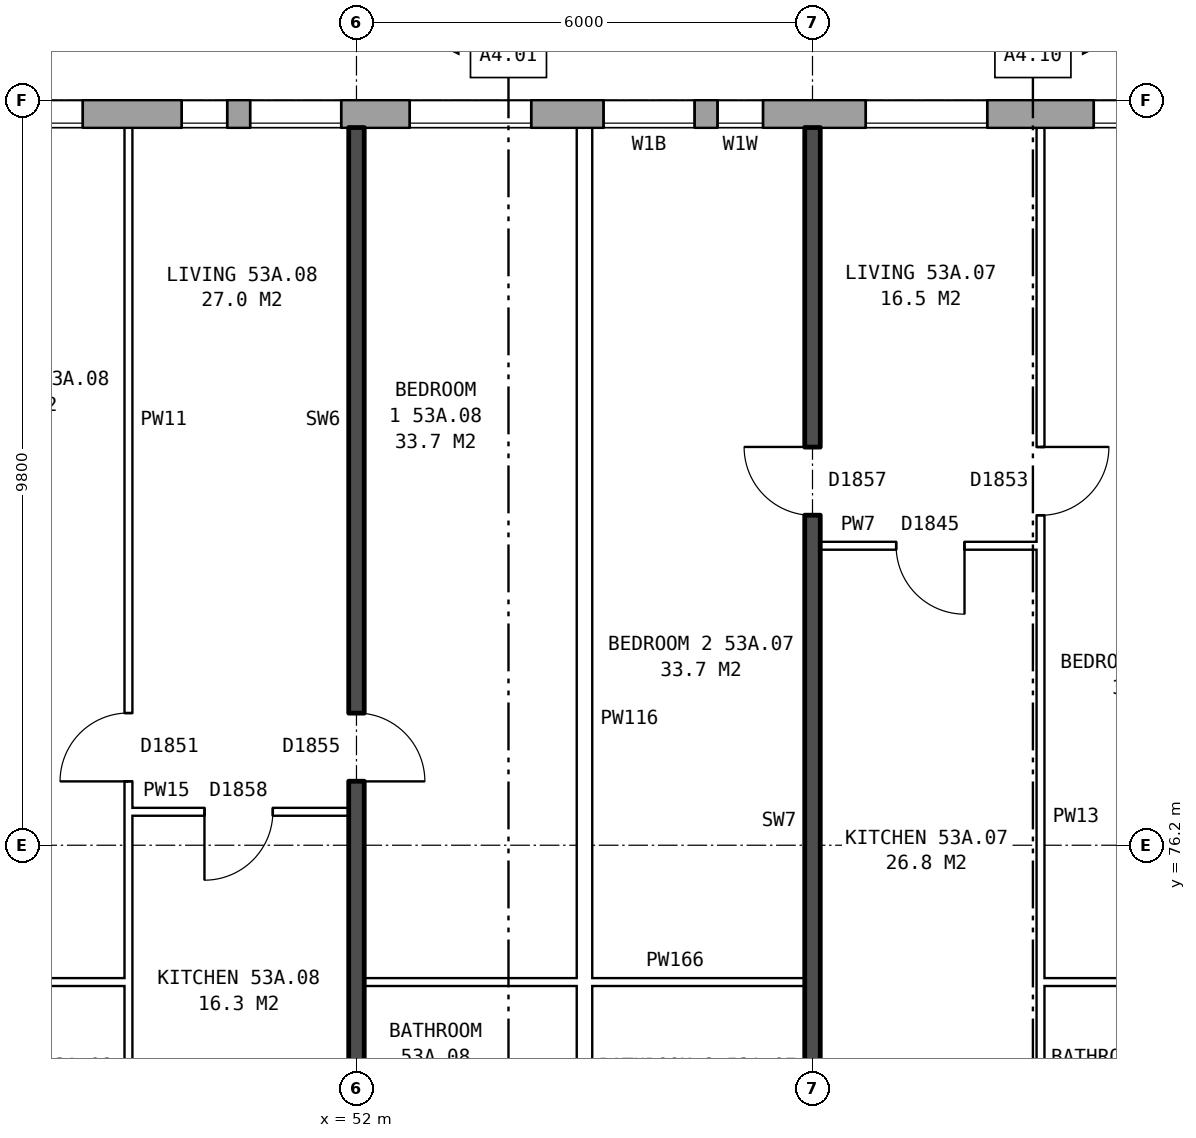
"""IFC4 building model, lengths in metres.
Left out: names, types, materials, properties, quantities, classifications, styles, units other than length and angle.
Written with IfcOpenShell. Run it as: python <this file> out.ifc"""

import sys

from ifc_helpers import new_model, si_unit, direction, frame, frame_2d, origin, place, context, subcontext, project, spatial, rectangle, extrude, element, fill, save


model = new_model("IFC4")
c1 = context("Model", 3, precision=1e-05, world=origin(), true_north=direction((0.0, 1.0)))
c2 = subcontext(c1, "Body", "Model", "MODEL_VIEW")
j1 = project(units=[si_unit("LENGTHUNIT", "METRE"), si_unit("PLANEANGLEUNIT", "RADIAN")], contexts=[c1])
p1 = place(None, origin())
s1 = spatial("IfcSite", under=j1, at=p1, CompositionType="ELEMENT")
p2 = place(p1, origin())
s2 = spatial("IfcBuilding", under=s1, at=p2, CompositionType="ELEMENT")
p3 = place(p2, frame((0.0, 0.0, 188.2)))
s3 = spatial("IfcBuildingStorey", under=s2, at=p3, CompositionType="ELEMENT", Elevation=188.2)
p4 = place(p3, frame((72.925, 85.82, 0.0), z_axis=(0.0, 0.0, 1.0), x_axis=(-1.0, 0.0, 0.0)))
e1 = element("IfcWall", 1, at=p4, inside=s3, PredefinedType="STANDARD", context=c2, shape_type="SweptSolid", body=[
    extrude(rectangle(XDim=39.601, YDim=0.36, at=frame_2d((19.8, 0.0))), origin(), (0.0, 0.0, 1.0), 2.85),
])
p5 = place(p4, frame((0.625, 0.0, 0.8)))
e2 = element("IfcOpeningElement", 2, at=p5, cuts=e1, PredefinedType="OPENING", context=c2, shape_type="SweptSolid", body=[
    extrude(rectangle(XDim=1.6, YDim=1.8, at=frame_2d((0.8, 0.9))), frame((0.0, 0.19, 0.0), z_axis=(0.0, -1.0, 0.0), x_axis=(1.0, 0.0, 0.0)), (0.0, 0.0, 1.0), 0.38),
])
p6 = place(p4, frame((3.625, 0.0, 0.8)))
e3 = element("IfcOpeningElement", 3, at=p6, cuts=e1, PredefinedType="OPENING", context=c2, shape_type="SweptSolid", body=[
    extrude(rectangle(XDim=1.6, YDim=1.8, at=frame_2d((0.8, 0.9))), frame((0.0, 0.19, 0.0), z_axis=(0.0, -1.0, 0.0), x_axis=(1.0, 0.0, 0.0)), (0.0, 0.0, 1.0), 0.38),
])
p7 = place(p4, frame((6.625, 0.0, 0.8)))
e4 = element("IfcOpeningElement", 4, at=p7, cuts=e1, PredefinedType="OPENING", context=c2, shape_type="SweptSolid", body=[
    extrude(rectangle(XDim=1.6, YDim=1.8, at=frame_2d((0.8, 0.9))), frame((0.0, 0.19, 0.0), z_axis=(0.0, -1.0, 0.0), x_axis=(1.0, 0.0, 0.0)), (0.0, 0.0, 1.0), 0.38),
])
p8 = place(p4, frame((9.625, 0.0, 0.8)))
e5 = element("IfcOpeningElement", 5, at=p8, cuts=e1, PredefinedType="OPENING", context=c2, shape_type="SweptSolid", body=[
    extrude(rectangle(XDim=1.6, YDim=1.8, at=frame_2d((0.8, 0.9))), frame((0.0, 0.19, 0.0), z_axis=(0.0, -1.0, 0.0), x_axis=(1.0, 0.0, 0.0)), (0.0, 0.0, 1.0), 0.38),
])
p9 = place(p4, frame((12.625, 0.0, 0.8)))
e6 = element("IfcOpeningElement", 6, at=p9, cuts=e1, PredefinedType="OPENING", context=c2, shape_type="SweptSolid", body=[
    extrude(rectangle(XDim=1.6, YDim=1.8, at=frame_2d((0.8, 0.9))), frame((0.0, 0.19, 0.0), z_axis=(0.0, -1.0, 0.0), x_axis=(1.0, 0.0, 0.0)), (0.0, 0.0, 1.0), 0.38),
])
p10 = place(p4, frame((15.575, 0.0, 0.15)))
e7 = element("IfcOpeningElement", 7, at=p10, cuts=e1, PredefinedType="OPENING", context=c2, shape_type="SweptSolid", body=[
    extrude(rectangle(XDim=0.6, YDim=0.9, at=frame_2d((0.3, 0.45))), frame((0.0, 0.19, 0.0), z_axis=(0.0, -1.0, 0.0), x_axis=(1.0, 0.0, 0.0)), (0.0, 0.0, 1.0), 0.38),
])
p11 = place(p4, frame((18.625, 0.0, 0.8)))
e8 = element("IfcOpeningElement", 8, at=p11, cuts=e1, PredefinedType="OPENING", context=c2, shape_type="SweptSolid", body=[
    extrude(rectangle(XDim=1.6, YDim=1.8, at=frame_2d((0.8, 0.9))), frame((0.0, 0.19, 0.0), z_axis=(0.0, -1.0, 0.0), x_axis=(1.0, 0.0, 0.0)), (0.0, 0.0, 1.0), 0.38),
])
p12 = place(p4, frame((21.125, 0.0, 0.8)))
e9 = element("IfcOpeningElement", 9, at=p12, cuts=e1, PredefinedType="OPENING", context=c2, shape_type="SweptSolid", body=[
    extrude(rectangle(XDim=1.2, YDim=1.8, at=frame_2d((0.6, 0.9))), frame((0.0, 0.19, 0.0), z_axis=(0.0, -1.0, 0.0), x_axis=(1.0, 0.0, 0.0)), (0.0, 0.0, 1.0), 0.38),
])
p13 = place(p4, frame((24.525, 0.0, 1.7)))
e10 = element("IfcOpeningElement", 10, at=p13, cuts=e1, PredefinedType="OPENING", context=c2, shape_type="SweptSolid", body=[
    extrude(rectangle(XDim=0.6, YDim=0.9, at=frame_2d((0.3, 0.45))), frame((0.0, 0.19, 0.0), z_axis=(0.0, -1.0, 0.0), x_axis=(1.0, 0.0, 0.0)), (0.0, 0.0, 1.0), 0.38),
])
p14 = place(p4, frame((27.625, 0.0, 0.8)))
e11 = element("IfcOpeningElement", 11, at=p14, cuts=e1, PredefinedType="OPENING", context=c2, shape_type="SweptSolid", body=[
    extrude(rectangle(XDim=1.6, YDim=1.8, at=frame_2d((0.8, 0.9))), frame((0.0, 0.19, 0.0), z_axis=(0.0, -1.0, 0.0), x_axis=(1.0, 0.0, 0.0)), (0.0, 0.0, 1.0), 0.38),
])
p15 = place(p4, frame((30.625, 0.0, 0.8)))
e12 = element("IfcOpeningElement", 12, at=p15, cuts=e1, PredefinedType="OPENING", context=c2, shape_type="SweptSolid", body=[
    extrude(rectangle(XDim=1.6, YDim=1.8, at=frame_2d((0.8, 0.9))), frame((0.0, 0.19, 0.0), z_axis=(0.0, -1.0, 0.0), x_axis=(1.0, 0.0, 0.0)), (0.0, 0.0, 1.0), 0.38),
])
p16 = place(p4, frame((33.625, 0.0, 0.8)))
e13 = element("IfcOpeningElement", 13, at=p16, cuts=e1, PredefinedType="OPENING", context=c2, shape_type="SweptSolid", body=[
    extrude(rectangle(XDim=1.6, YDim=1.8, at=frame_2d((0.8, 0.9))), frame((0.0, 0.19, 0.0), z_axis=(0.0, -1.0, 0.0), x_axis=(1.0, 0.0, 0.0)), (0.0, 0.0, 1.0), 0.38),
])
p17 = place(p4, frame((36.625, 0.0, 0.8)))
e14 = element("IfcOpeningElement", 14, at=p17, cuts=e1, PredefinedType="OPENING", context=c2, shape_type="SweptSolid", body=[
    extrude(rectangle(XDim=1.6, YDim=1.8, at=frame_2d((0.8, 0.9))), frame((0.0, 0.19, 0.0), z_axis=(0.0, -1.0, 0.0), x_axis=(1.0, 0.0, 0.0)), (0.0, 0.0, 1.0), 0.38),
])
p18 = place(p4, frame((16.475, 0.0, 0.15)))
e15 = element("IfcOpeningElement", 15, at=p18, cuts=e1, PredefinedType="OPENING", context=c2, shape_type="SweptSolid", body=[
    extrude(rectangle(XDim=1.2, YDim=1.8, at=frame_2d((0.6, 0.9))), frame((0.0, 0.19, 0.0), z_axis=(0.0, -1.0, 0.0), x_axis=(1.0, 0.0, 0.0)), (0.0, 0.0, 1.0), 0.38),
])
p19 = place(p4, frame((22.625, 0.0, 0.8)))
e16 = element("IfcOpeningElement", 16, at=p19, cuts=e1, PredefinedType="OPENING", context=c2, shape_type="SweptSolid", body=[
    extrude(rectangle(XDim=0.6, YDim=0.9, at=frame_2d((0.3, 0.45))), frame((0.0, 0.19, 0.0), z_axis=(0.0, -1.0, 0.0), x_axis=(1.0, 0.0, 0.0)), (0.0, 0.0, 1.0), 0.38),
])
p20 = place(p4, frame((25.425, 0.0, 0.8)))
e17 = element("IfcOpeningElement", 17, at=p20, cuts=e1, PredefinedType="OPENING", context=c2, shape_type="SweptSolid", body=[
    extrude(rectangle(XDim=1.2, YDim=1.8, at=frame_2d((0.6, 0.9))), frame((0.0, 0.19, 0.0), z_axis=(0.0, -1.0, 0.0), x_axis=(1.0, 0.0, 0.0)), (0.0, 0.0, 1.0), 0.38),
])
p21 = place(p3, frame((46.1, 74.4, 0.0), z_axis=(0.0, 0.0, 1.0), x_axis=(1.0, 0.0, 0.0)))
e18 = element("IfcWall", 18, at=p21, inside=s3, PredefinedType="PARTITIONING", context=c2, shape_type="SweptSolid", body=[
    extrude(rectangle(XDim=2.9, YDim=0.1, at=frame_2d((1.45, 0.0))), origin(), (0.0, 0.0, 1.0), 2.85),
])
p22 = place(p3, frame((52.1, 74.4, 0.0), z_axis=(0.0, 0.0, 1.0), x_axis=(1.0, 0.0, 0.0)))
e19 = element("IfcWall", 19, at=p22, inside=s3, PredefinedType="PARTITIONING", context=c2, shape_type="SweptSolid", body=[
    extrude(rectangle(XDim=5.8, YDim=0.1, at=frame_2d((2.9, 0.0))), origin(), (0.0, 0.0, 1.0), 2.85),
])
p23 = place(p3, frame((61.0, 74.4, 0.0), z_axis=(0.0, 0.0, 1.0), x_axis=(1.0, 0.0, 0.0)))
e20 = element("IfcWall", 20, at=p23, inside=s3, PredefinedType="PARTITIONING", context=c2, shape_type="SweptSolid", body=[
    extrude(rectangle(XDim=2.64, YDim=0.1, at=frame_2d((1.32, 0.0))), origin(), (0.0, 0.0, 1.0), 2.85),
])
p24 = place(p3, frame((49.0, 76.64, 0.0), z_axis=(0.0, 0.0, 1.0), x_axis=(1.0, 0.0, 0.0)))
e21 = element("IfcWall", 21, at=p24, inside=s3, PredefinedType="PARTITIONING", context=c2, shape_type="SweptSolid", body=[
    extrude(rectangle(XDim=2.9, YDim=0.1, at=frame_2d((1.45, 0.0))), origin(), (0.0, 0.0, 1.0), 2.85),
])
p25 = place(p24, frame((1.0, 0.0, 0.0)))
e22 = element("IfcOpeningElement", 22, at=p25, cuts=e21, PredefinedType="OPENING", context=c2, shape_type="SweptSolid", body=[
    extrude(rectangle(XDim=0.9, YDim=2.1, at=frame_2d((0.45, 1.05))), frame((0.0, 0.06, 0.0), z_axis=(0.0, -1.0, 0.0), x_axis=(1.0, 0.0, 0.0)), (0.0, 0.0, 1.0), 0.12),
])
p26 = place(p3, frame((58.1, 80.14, 0.0), z_axis=(0.0, 0.0, 1.0), x_axis=(1.0, 0.0, 0.0)))
e23 = element("IfcWall", 23, at=p26, inside=s3, PredefinedType="PARTITIONING", context=c2, shape_type="SweptSolid", body=[
    extrude(rectangle(XDim=2.9, YDim=0.1, at=frame_2d((1.45, 0.0))), origin(), (0.0, 0.0, 1.0), 2.85),
])
p27 = place(p26, frame((1.0, 0.0, 0.0)))
e24 = element("IfcOpeningElement", 24, at=p27, cuts=e23, PredefinedType="OPENING", context=c2, shape_type="SweptSolid", body=[
    extrude(rectangle(XDim=0.9, YDim=2.1, at=frame_2d((0.45, 1.05))), frame((0.0, 0.06, 0.0), z_axis=(0.0, -1.0, 0.0), x_axis=(1.0, 0.0, 0.0)), (0.0, 0.0, 1.0), 0.12),
])
p28 = place(p3, frame((49.0, 71.3, 0.0), z_axis=(0.0, 0.0, 1.0), x_axis=(0.0, 1.0, 0.0)))
e25 = element("IfcWall", 25, at=p28, inside=s3, PredefinedType="PARTITIONING", context=c2, shape_type="SweptSolid", body=[
    extrude(rectangle(XDim=14.34, YDim=0.1, at=frame_2d((7.17, 0.0))), origin(), (0.0, 0.0, 1.0), 2.85),
])
p29 = place(p28, frame((5.74, 0.0, 0.0)))
e26 = element("IfcOpeningElement", 26, at=p29, cuts=e25, PredefinedType="OPENING", context=c2, shape_type="SweptSolid", body=[
    extrude(rectangle(XDim=0.9, YDim=2.1, at=frame_2d((0.45, 1.05))), frame((0.0, 0.06, 0.0), z_axis=(0.0, -1.0, 0.0), x_axis=(1.0, 0.0, 0.0)), (0.0, 0.0, 1.0), 0.12),
])
p30 = place(p28, frame((0.4, 0.0, 0.0)))
e27 = element("IfcOpeningElement", 27, at=p30, cuts=e25, PredefinedType="OPENING", context=c2, shape_type="SweptSolid", body=[
    extrude(rectangle(XDim=0.9, YDim=2.1, at=frame_2d((0.45, 1.05))), frame((0.0, 0.06, 0.0), z_axis=(0.0, -1.0, 0.0), x_axis=(1.0, 0.0, 0.0)), (0.0, 0.0, 1.0), 0.12),
])
p31 = place(p3, frame((52.0, 71.2, 0.0), z_axis=(0.0, 0.0, 1.0), x_axis=(0.0, 1.0, 0.0)))
e28 = element("IfcWall", 28, at=p31, inside=s3, PredefinedType="SOLIDWALL", context=c2, shape_type="SweptSolid", body=[
    extrude(rectangle(XDim=14.44, YDim=0.2, at=frame_2d((7.22, 0.0))), origin(), (0.0, 0.0, 1.0), 2.85),
])
p32 = place(p31, frame((5.84, 0.0, 0.0)))
e29 = element("IfcOpeningElement", 29, at=p32, cuts=e28, PredefinedType="OPENING", context=c2, shape_type="SweptSolid", body=[
    extrude(rectangle(XDim=0.9, YDim=2.1, at=frame_2d((0.45, 1.05))), frame((0.0, 0.11, 0.0), z_axis=(0.0, -1.0, 0.0), x_axis=(1.0, 0.0, 0.0)), (0.0, 0.0, 1.0), 0.22),
])
p33 = place(p31, frame((0.4, 0.0, 0.0)))
e30 = element("IfcOpeningElement", 30, at=p33, cuts=e28, PredefinedType="OPENING", context=c2, shape_type="SweptSolid", body=[
    extrude(rectangle(XDim=0.9, YDim=2.1, at=frame_2d((0.45, 1.05))), frame((0.0, 0.11, 0.0), z_axis=(0.0, -1.0, 0.0), x_axis=(1.0, 0.0, 0.0)), (0.0, 0.0, 1.0), 0.22),
])
p34 = place(p3, frame((55.0, 71.3, 0.0), z_axis=(0.0, 0.0, 1.0), x_axis=(0.0, 1.0, 0.0)))
e31 = element("IfcWall", 31, at=p34, inside=s3, PredefinedType="PARTITIONING", context=c2, shape_type="SweptSolid", body=[
    extrude(rectangle(XDim=14.34, YDim=0.2, at=frame_2d((7.17, 0.0))), origin(), (0.0, 0.0, 1.0), 2.85),
])
p35 = place(p3, frame((58.0, 71.2, 0.0), z_axis=(0.0, 0.0, 1.0), x_axis=(0.0, 1.0, 0.0)))
e32 = element("IfcWall", 32, at=p35, inside=s3, PredefinedType="SOLIDWALL", context=c2, shape_type="SweptSolid", body=[
    extrude(rectangle(XDim=14.44, YDim=0.2, at=frame_2d((7.22, 0.0))), origin(), (0.0, 0.0, 1.0), 2.85),
])
p36 = place(p35, frame((9.34, 0.0, 0.0)))
e33 = element("IfcOpeningElement", 33, at=p36, cuts=e32, PredefinedType="OPENING", context=c2, shape_type="SweptSolid", body=[
    extrude(rectangle(XDim=0.9, YDim=2.1, at=frame_2d((0.45, 1.05))), frame((0.0, 0.11, 0.0), z_axis=(0.0, -1.0, 0.0), x_axis=(1.0, 0.0, 0.0)), (0.0, 0.0, 1.0), 0.22),
])
p37 = place(p35, frame((0.4, 0.0, 0.0)))
e34 = element("IfcOpeningElement", 34, at=p37, cuts=e32, PredefinedType="OPENING", context=c2, shape_type="SweptSolid", body=[
    extrude(rectangle(XDim=0.9, YDim=2.1, at=frame_2d((0.45, 1.05))), frame((0.0, 0.11, 0.0), z_axis=(0.0, -1.0, 0.0), x_axis=(1.0, 0.0, 0.0)), (0.0, 0.0, 1.0), 0.22),
])
p38 = place(p3, frame((61.0, 71.3, 0.0), z_axis=(0.0, 0.0, 1.0), x_axis=(0.0, 1.0, 0.0)))
e35 = element("IfcWall", 35, at=p38, inside=s3, PredefinedType="PARTITIONING", context=c2, shape_type="SweptSolid", body=[
    extrude(rectangle(XDim=14.34, YDim=0.1, at=frame_2d((7.17, 0.0))), origin(), (0.0, 0.0, 1.0), 2.85),
])
p39 = place(p38, frame((9.24, 0.0, 0.0)))
e36 = element("IfcOpeningElement", 36, at=p39, cuts=e35, PredefinedType="OPENING", context=c2, shape_type="SweptSolid", body=[
    extrude(rectangle(XDim=0.9, YDim=2.1, at=frame_2d((0.45, 1.05))), frame((0.0, 0.06, 0.0), z_axis=(0.0, -1.0, 0.0), x_axis=(1.0, 0.0, 0.0)), (0.0, 0.0, 1.0), 0.12),
])
p40 = place(p38, frame((0.4, 0.0, 0.0)))
e37 = element("IfcOpeningElement", 37, at=p40, cuts=e35, PredefinedType="OPENING", context=c2, shape_type="SweptSolid", body=[
    extrude(rectangle(XDim=0.9, YDim=2.1, at=frame_2d((0.45, 1.05))), frame((0.0, 0.06, 0.0), z_axis=(0.0, -1.0, 0.0), x_axis=(1.0, 0.0, 0.0)), (0.0, 0.0, 1.0), 0.12),
])
p41 = place(p8, origin())
e38 = element("IfcWindow", 38, at=p41, inside=s3, PartitioningType="SINGLE_PANEL", PredefinedType="WINDOW", context=c2, shape_type="SweptSolid", body=[
    extrude(rectangle(XDim=1.6, YDim=1.8, at=frame_2d((0.8, 0.9))), frame((0.0, 0.15, 0.0), z_axis=(0.0, -1.0, 0.0), x_axis=(1.0, 0.0, 0.0)), (0.0, 0.0, 1.0), 0.06),
])
fill(e5, e38)
p42 = place(p9, origin())
e39 = element("IfcWindow", 39, at=p42, inside=s3, PartitioningType="SINGLE_PANEL", PredefinedType="WINDOW", context=c2, shape_type="SweptSolid", body=[
    extrude(rectangle(XDim=1.6, YDim=1.8, at=frame_2d((0.8, 0.9))), frame((0.0, 0.15, 0.0), z_axis=(0.0, -1.0, 0.0), x_axis=(1.0, 0.0, 0.0)), (0.0, 0.0, 1.0), 0.06),
])
fill(e6, e39)
p43 = place(p10, origin())
e40 = element("IfcWindow", 40, at=p43, inside=s3, PartitioningType="SINGLE_PANEL", PredefinedType="WINDOW", context=c2, shape_type="SweptSolid", body=[
    extrude(rectangle(XDim=0.6, YDim=0.9, at=frame_2d((0.3, 0.45))), frame((0.0, 0.15, 0.0), z_axis=(0.0, -1.0, 0.0), x_axis=(1.0, 0.0, 0.0)), (0.0, 0.0, 1.0), 0.06),
])
fill(e7, e40)
p44 = place(p11, origin())
e41 = element("IfcWindow", 41, at=p44, inside=s3, PartitioningType="SINGLE_PANEL", PredefinedType="WINDOW", context=c2, shape_type="SweptSolid", body=[
    extrude(rectangle(XDim=1.6, YDim=1.8, at=frame_2d((0.8, 0.9))), frame((0.0, 0.15, 0.0), z_axis=(0.0, -1.0, 0.0), x_axis=(1.0, 0.0, 0.0)), (0.0, 0.0, 1.0), 0.06),
])
fill(e8, e41)
p45 = place(p12, origin())
e42 = element("IfcWindow", 42, at=p45, inside=s3, PartitioningType="SINGLE_PANEL", PredefinedType="WINDOW", context=c2, shape_type="SweptSolid", body=[
    extrude(rectangle(XDim=1.2, YDim=1.8, at=frame_2d((0.6, 0.9))), frame((0.0, 0.15, 0.0), z_axis=(0.0, -1.0, 0.0), x_axis=(1.0, 0.0, 0.0)), (0.0, 0.0, 1.0), 0.06),
])
fill(e9, e42)
p46 = place(p13, origin())
e43 = element("IfcWindow", 43, at=p46, inside=s3, PartitioningType="SINGLE_PANEL", PredefinedType="WINDOW", context=c2, shape_type="SweptSolid", body=[
    extrude(rectangle(XDim=0.6, YDim=0.9, at=frame_2d((0.3, 0.45))), frame((0.0, 0.15, 0.0), z_axis=(0.0, -1.0, 0.0), x_axis=(1.0, 0.0, 0.0)), (0.0, 0.0, 1.0), 0.06),
])
fill(e10, e43)
p47 = place(p39, frame((0.9, 0.0, 0.0), z_axis=(0.0, 0.0, 1.0), x_axis=(-1.0, 0.0, 0.0)))
e44 = element("IfcDoor", 44, at=p47, inside=s3, OperationType="SINGLE_SWING_LEFT", PredefinedType="DOOR", context=c2, shape_type="SweptSolid", body=[
    extrude(rectangle(XDim=0.9, YDim=2.1, at=frame_2d((0.45, 1.05))), frame((0.0, 0.025, 0.0), z_axis=(0.0, -1.0, 0.0), x_axis=(1.0, 0.0, 0.0)), (0.0, 0.0, 1.0), 0.05),
])
fill(e36, e44)
p48 = place(p36, origin())
e45 = element("IfcDoor", 45, at=p48, inside=s3, OperationType="SINGLE_SWING_RIGHT", PredefinedType="DOOR", context=c2, shape_type="SweptSolid", body=[
    extrude(rectangle(XDim=0.9, YDim=2.1, at=frame_2d((0.45, 1.05))), frame((0.0, 0.025, 0.0), z_axis=(0.0, -1.0, 0.0), x_axis=(1.0, 0.0, 0.0)), (0.0, 0.0, 1.0), 0.05),
])
fill(e33, e45)
p49 = place(p27, frame((0.9, 0.0, 0.0), z_axis=(0.0, 0.0, 1.0), x_axis=(-1.0, 0.0, 0.0)))
e46 = element("IfcDoor", 46, at=p49, inside=s3, OperationType="SINGLE_SWING_LEFT", PredefinedType="DOOR", context=c2, shape_type="SweptSolid", body=[
    extrude(rectangle(XDim=0.9, YDim=2.1, at=frame_2d((0.45, 1.05))), frame((0.0, 0.025, 0.0), z_axis=(0.0, -1.0, 0.0), x_axis=(1.0, 0.0, 0.0)), (0.0, 0.0, 1.0), 0.05),
])
fill(e24, e46)
p50 = place(p32, frame((0.9, 0.0, 0.0), z_axis=(0.0, 0.0, 1.0), x_axis=(-1.0, 0.0, 0.0)))
e47 = element("IfcDoor", 47, at=p50, inside=s3, OperationType="SINGLE_SWING_RIGHT", PredefinedType="DOOR", context=c2, shape_type="SweptSolid", body=[
    extrude(rectangle(XDim=0.9, YDim=2.1, at=frame_2d((0.45, 1.05))), frame((0.0, 0.025, 0.0), z_axis=(0.0, -1.0, 0.0), x_axis=(1.0, 0.0, 0.0)), (0.0, 0.0, 1.0), 0.05),
])
fill(e29, e47)
p51 = place(p29, origin())
e48 = element("IfcDoor", 48, at=p51, inside=s3, OperationType="SINGLE_SWING_LEFT", PredefinedType="DOOR", context=c2, shape_type="SweptSolid", body=[
    extrude(rectangle(XDim=0.9, YDim=2.1, at=frame_2d((0.45, 1.05))), frame((0.0, 0.025, 0.0), z_axis=(0.0, -1.0, 0.0), x_axis=(1.0, 0.0, 0.0)), (0.0, 0.0, 1.0), 0.05),
])
fill(e26, e48)
p52 = place(p25, frame((0.9, 0.0, 0.0), z_axis=(0.0, 0.0, 1.0), x_axis=(-1.0, 0.0, 0.0)))
e49 = element("IfcDoor", 49, at=p52, inside=s3, OperationType="SINGLE_SWING_RIGHT", PredefinedType="DOOR", context=c2, shape_type="SweptSolid", body=[
    extrude(rectangle(XDim=0.9, YDim=2.1, at=frame_2d((0.45, 1.05))), frame((0.0, 0.025, 0.0), z_axis=(0.0, -1.0, 0.0), x_axis=(1.0, 0.0, 0.0)), (0.0, 0.0, 1.0), 0.05),
])
fill(e22, e49)
p53 = place(p18, origin())
e50 = element("IfcWindow", 50, at=p53, inside=s3, PartitioningType="SINGLE_PANEL", PredefinedType="WINDOW", context=c2, shape_type="SweptSolid", body=[
    extrude(rectangle(XDim=1.2, YDim=1.8, at=frame_2d((0.6, 0.9))), frame((0.0, 0.15, 0.0), z_axis=(0.0, -1.0, 0.0), x_axis=(1.0, 0.0, 0.0)), (0.0, 0.0, 1.0), 0.06),
])
fill(e15, e50)
p54 = place(p19, origin())
e51 = element("IfcWindow", 51, at=p54, inside=s3, PartitioningType="SINGLE_PANEL", PredefinedType="WINDOW", context=c2, shape_type="SweptSolid", body=[
    extrude(rectangle(XDim=0.6, YDim=0.9, at=frame_2d((0.3, 0.45))), frame((0.0, 0.15, 0.0), z_axis=(0.0, -1.0, 0.0), x_axis=(1.0, 0.0, 0.0)), (0.0, 0.0, 1.0), 0.06),
])
fill(e16, e51)
save(model, sys.argv[1])
